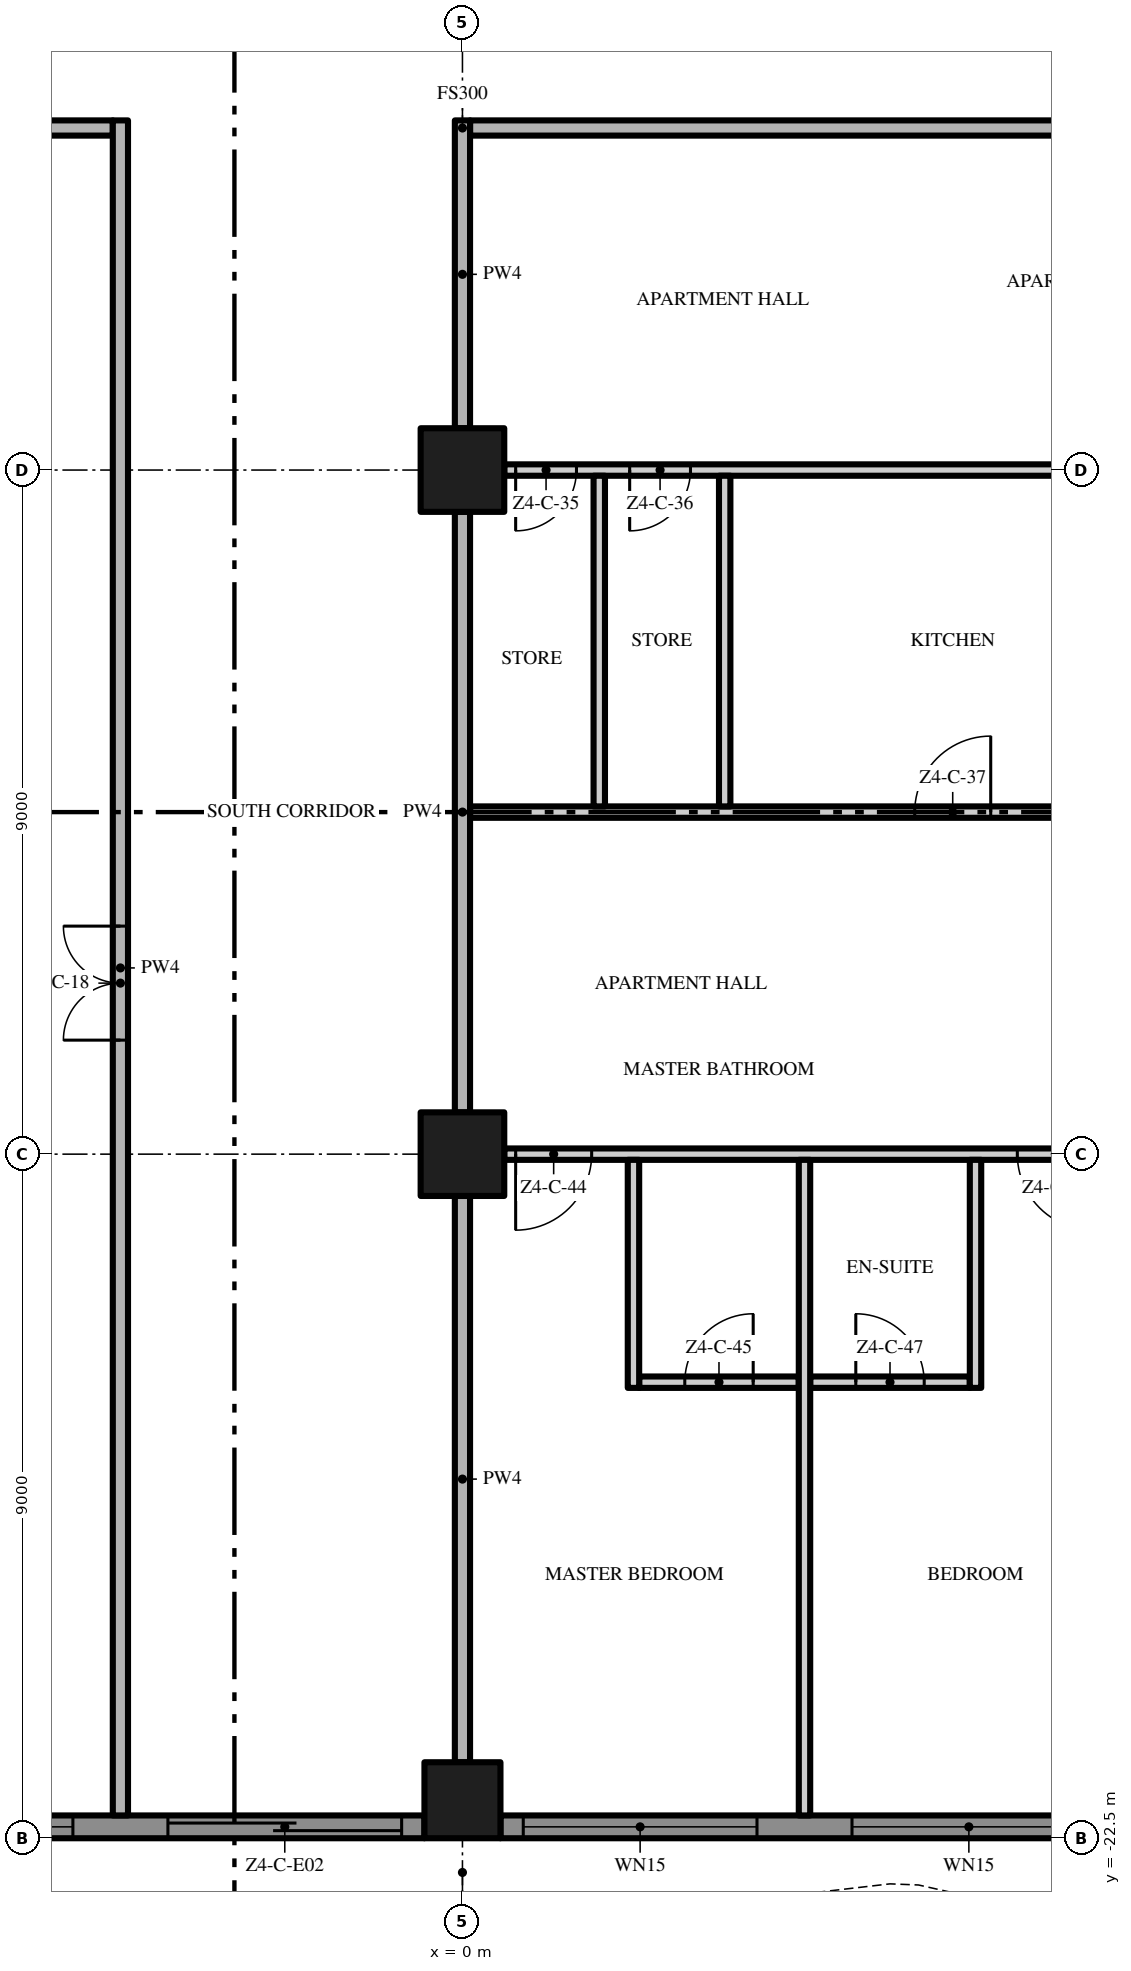
"""IFC4 building model, lengths in metres.
Left out: names, types, materials, properties, quantities, classifications, styles, units other than length and angle.
Written with IfcOpenShell. Run it as: python <this file> out.ifc"""

import sys

from ifc_helpers import new_model, si_unit, direction, frame, frame_2d, origin, origin_2d, place, context, subcontext, project, spatial, polyline, rectangle, outline, extrude, element, fill, save


model = new_model("IFC4")
c1 = context("Model", 3, precision=1e-05, world=origin(), true_north=direction((0.0, 1.0)))
c2 = subcontext(c1, "Body", "Model", "MODEL_VIEW")
j1 = project(units=[si_unit("LENGTHUNIT", "METRE"), si_unit("PLANEANGLEUNIT", "RADIAN")], contexts=[c1])
p1 = place(None, origin())
s1 = spatial("IfcSite", under=j1, at=p1, CompositionType="ELEMENT")
p2 = place(p1, origin())
s2 = spatial("IfcBuilding", under=s1, at=p2, CompositionType="ELEMENT")
p3 = place(p2, frame((0.0, 0.0, 207.2)))
s3 = spatial("IfcBuildingStorey", under=s2, at=p3, CompositionType="ELEMENT", Elevation=207.2)
p4 = place(p3, frame((0.0, -13.5, 0.0), z_axis=(0.0, 0.0, 1.0), x_axis=(1.0, 0.0, 0.0)))
e1 = element("IfcColumn", 1, at=p4, inside=s3, PredefinedType="COLUMN", context=c2, shape_type="SweptSolid", body=[
    extrude(rectangle(XDim=1.1, YDim=1.1, at=origin_2d()), origin(), (0.0, 0.0, 1.0), 3.5),
])
p5 = place(p3, frame((0.0, -22.0, 0.0), z_axis=(0.0, 0.0, 1.0), x_axis=(1.0, 0.0, 0.0)))
e2 = element("IfcColumn", 2, at=p5, inside=s3, PredefinedType="COLUMN", context=c2, shape_type="SweptSolid", body=[
    extrude(rectangle(XDim=1.0, YDim=1.0, at=origin_2d()), origin(), (0.0, 0.0, 1.0), 3.5),
])
p6 = place(p3, frame((0.0, -4.5, 0.0), z_axis=(0.0, 0.0, 1.0), x_axis=(1.0, 0.0, 0.0)))
e3 = element("IfcColumn", 3, at=p6, inside=s3, PredefinedType="COLUMN", context=c2, shape_type="SweptSolid", body=[
    extrude(rectangle(XDim=1.1, YDim=1.1, at=origin_2d()), origin(), (0.0, 0.0, 1.0), 3.5),
])
p7 = place(p3, frame((-0.5, -22.35, 0.0), z_axis=(0.0, 0.0, 1.0), x_axis=(-1.0, 0.0, 0.0)))
e4 = element("IfcWall", 4, at=p7, inside=s3, PredefinedType="SOLIDWALL", context=c2, shape_type="SweptSolid", body=[
    extrude(rectangle(XDim=8.0, YDim=0.3, at=frame_2d((4.0, 0.0))), origin(), (0.0, 0.0, 1.0), 3.5),
])
p8 = place(p7, frame((4.625, 0.0, 0.45)))
e5 = element("IfcOpeningElement", 5, at=p8, cuts=e4, PredefinedType="OPENING", context=c2, shape_type="SweptSolid", body=[
    extrude(rectangle(XDim=3.075, YDim=2.65, at=frame_2d((1.538, 1.325))), frame((0.0, 0.16, 0.0), z_axis=(0.0, -1.0, 0.0), x_axis=(1.0, 0.0, 0.0)), (0.0, 0.0, 1.0), 0.32),
])
p9 = place(p7, frame((0.3, 0.0, 0.0)))
e6 = element("IfcOpeningElement", 6, at=p9, cuts=e4, PredefinedType="OPENING", context=c2, shape_type="SweptSolid", body=[
    extrude(rectangle(XDim=3.075, YDim=2.4, at=frame_2d((1.538, 1.2))), frame((0.0, 0.16, 0.0), z_axis=(0.0, -1.0, 0.0), x_axis=(1.0, 0.0, 0.0)), (0.0, 0.0, 1.0), 0.32),
])
p10 = place(p3, frame((8.5, -22.35, 0.0), z_axis=(0.0, 0.0, 1.0), x_axis=(-1.0, 0.0, 0.0)))
e7 = element("IfcWall", 7, at=p10, inside=s3, PredefinedType="SOLIDWALL", context=c2, shape_type="SweptSolid", body=[
    extrude(rectangle(XDim=8.0, YDim=0.3, at=frame_2d((4.0, 0.0))), origin(), (0.0, 0.0, 1.0), 3.5),
])
p11 = place(p10, frame((4.625, 0.0, 0.45)))
e8 = element("IfcOpeningElement", 8, at=p11, cuts=e7, PredefinedType="OPENING", context=c2, shape_type="SweptSolid", body=[
    extrude(rectangle(XDim=3.075, YDim=2.65, at=frame_2d((1.538, 1.325))), frame((0.0, 0.16, 0.0), z_axis=(0.0, -1.0, 0.0), x_axis=(1.0, 0.0, 0.0)), (0.0, 0.0, 1.0), 0.32),
])
p12 = place(p10, frame((0.3, 0.0, 0.45)))
e9 = element("IfcOpeningElement", 9, at=p12, cuts=e7, PredefinedType="OPENING", context=c2, shape_type="SweptSolid", body=[
    extrude(rectangle(XDim=3.075, YDim=2.65, at=frame_2d((1.538, 1.325))), frame((0.0, 0.16, 0.0), z_axis=(0.0, -1.0, 0.0), x_axis=(1.0, 0.0, 0.0)), (0.0, 0.0, 1.0), 0.32),
])
p13 = place(p3, origin())
e10 = element("IfcWall", 10, at=p13, inside=s3, PredefinedType="USERDEFINED", context=c2, shape_type="SweptSolid", body=[
    extrude(outline(polyline([(-22.5, -23.451), (-21.0, -24.112), (-19.5, -24.845), (-18.0, -25.369), (-16.875, -25.5), (-16.5, -25.485), (-15.0, -25.149), (-13.5, -24.488), (-12.0, -23.755), (-10.5, -23.231), (-9.375, -23.1), (-9.0, -23.115), (-7.5, -23.451), (-6.0, -24.112), (-4.5, -24.845), (-3.0, -25.369), (-1.875, -25.5), (-1.5, -25.485), (0.0, -25.149), (1.5, -24.488), (3.0, -23.755), (4.5, -23.231), (5.625, -23.1), (6.0, -23.115), (7.5, -23.451), (9.0, -24.112), (10.5, -24.845), (12.0, -25.369), (13.125, -25.5), (13.5, -25.485), (15.0, -25.149), (16.5, -24.488), (18.0, -23.755), (19.5, -23.231), (20.625, -23.1), (21.0, -23.115), (22.5, -23.451), (22.555, -23.208), (21.033, -22.866), (20.615, -22.849), (19.444, -22.986), (17.904, -23.524), (16.395, -24.261), (14.921, -24.91), (13.467, -25.236), (13.135, -25.249), (12.056, -25.124), (10.596, -24.614), (9.105, -23.885), (7.579, -23.213), (6.033, -22.866), (5.615, -22.849), (4.444, -22.986), (2.904, -23.524), (1.395, -24.261), (-0.079, -24.91), (-1.533, -25.236), (-1.865, -25.249), (-2.944, -25.124), (-4.404, -24.614), (-5.895, -23.885), (-7.421, -23.213), (-8.967, -22.866), (-9.385, -22.849), (-10.556, -22.986), (-12.096, -23.524), (-13.605, -24.261), (-15.079, -24.91), (-16.533, -25.236), (-16.865, -25.249), (-17.944, -25.124), (-19.404, -24.614), (-20.895, -23.885), (-22.399, -23.223), (-22.5, -23.451)])), origin(), (0.0, 0.0, 1.0), 0.9),
])
p14 = place(p3, frame((2.325, -16.5, 0.0), z_axis=(0.0, 0.0, 1.0), x_axis=(1.0, 0.0, 0.0)))
e11 = element("IfcWall", 11, at=p14, inside=s3, PredefinedType="PARTITIONING", context=c2, shape_type="SweptSolid", body=[
    extrude(rectangle(XDim=2.1, YDim=0.15, at=frame_2d((1.05, 0.0))), origin(), (0.0, 0.0, 1.0), 3.5),
])
p15 = place(p14, frame((0.6, 0.0, 0.0)))
e12 = element("IfcOpeningElement", 12, at=p15, cuts=e11, PredefinedType="OPENING", context=c2, shape_type="SweptSolid", body=[
    extrude(rectangle(XDim=0.9, YDim=2.1, at=frame_2d((0.45, 1.05))), frame((0.0, 0.085, 0.0), z_axis=(0.0, -1.0, 0.0), x_axis=(1.0, 0.0, 0.0)), (0.0, 0.0, 1.0), 0.17),
])
p16 = place(p3, frame((4.575, -16.5, 0.0), z_axis=(0.0, 0.0, 1.0), x_axis=(1.0, 0.0, 0.0)))
e13 = element("IfcWall", 13, at=p16, inside=s3, PredefinedType="PARTITIONING", context=c2, shape_type="SweptSolid", body=[
    extrude(rectangle(XDim=2.1, YDim=0.15, at=frame_2d((1.05, 0.0))), origin(), (0.0, 0.0, 1.0), 3.5),
])
p17 = place(p16, frame((0.6, 0.0, 0.0)))
e14 = element("IfcOpeningElement", 14, at=p17, cuts=e13, PredefinedType="OPENING", context=c2, shape_type="SweptSolid", body=[
    extrude(rectangle(XDim=0.9, YDim=2.1, at=frame_2d((0.45, 1.05))), frame((0.0, 0.085, 0.0), z_axis=(0.0, -1.0, 0.0), x_axis=(1.0, 0.0, 0.0)), (0.0, 0.0, 1.0), 0.17),
])
p18 = place(p3, frame((8.45, -13.5, 0.0), z_axis=(0.0, 0.0, 1.0), x_axis=(-1.0, 0.0, 0.0)))
e15 = element("IfcWall", 15, at=p18, inside=s3, PredefinedType="PARTITIONING", context=c2, shape_type="SweptSolid", body=[
    extrude(rectangle(XDim=7.9, YDim=0.15, at=frame_2d((3.95, 0.0))), origin(), (0.0, 0.0, 1.0), 3.5),
])
p19 = place(p18, frame((6.75, 0.0, 0.0)))
e16 = element("IfcOpeningElement", 16, at=p19, cuts=e15, PredefinedType="OPENING", context=c2, shape_type="SweptSolid", body=[
    extrude(rectangle(XDim=1.0, YDim=2.4, at=frame_2d((0.5, 1.2))), frame((0.0, 0.085, 0.0), z_axis=(0.0, -1.0, 0.0), x_axis=(1.0, 0.0, 0.0)), (0.0, 0.0, 1.0), 0.17),
])
p20 = place(p18, frame((0.15, 0.0, 0.0)))
e17 = element("IfcOpeningElement", 17, at=p20, cuts=e15, PredefinedType="OPENING", context=c2, shape_type="SweptSolid", body=[
    extrude(rectangle(XDim=1.0, YDim=2.4, at=frame_2d((0.5, 1.2))), frame((0.0, 0.085, 0.0), z_axis=(0.0, -1.0, 0.0), x_axis=(1.0, 0.0, 0.0)), (0.0, 0.0, 1.0), 0.17),
])
p21 = place(p3, frame((0.1, -9.0, 0.0), z_axis=(0.0, 0.0, 1.0), x_axis=(1.0, 0.0, 0.0)))
e18 = element("IfcWall", 18, at=p21, inside=s3, PredefinedType="PARTITIONING", context=c2, shape_type="SweptSolid", body=[
    extrude(rectangle(XDim=11.525, YDim=0.15, at=frame_2d((5.763, 0.0))), origin(), (0.0, 0.0, 1.0), 3.5),
])
p22 = place(p21, frame((5.85, 0.0, 0.0)))
e19 = element("IfcOpeningElement", 19, at=p22, cuts=e18, PredefinedType="OPENING", context=c2, shape_type="SweptSolid", body=[
    extrude(rectangle(XDim=1.0, YDim=2.4, at=frame_2d((0.5, 1.2))), frame((0.0, 0.085, 0.0), z_axis=(0.0, -1.0, 0.0), x_axis=(1.0, 0.0, 0.0)), (0.0, 0.0, 1.0), 0.17),
])
p23 = place(p3, frame((8.45, -4.5, 0.0), z_axis=(0.0, 0.0, 1.0), x_axis=(-1.0, 0.0, 0.0)))
e20 = element("IfcWall", 20, at=p23, inside=s3, PredefinedType="PARTITIONING", context=c2, shape_type="SweptSolid", body=[
    extrude(rectangle(XDim=7.9, YDim=0.15, at=frame_2d((3.95, 0.0))), origin(), (0.0, 0.0, 1.0), 3.5),
])
p24 = place(p23, frame((6.95, 0.0, 0.0)))
e21 = element("IfcOpeningElement", 21, at=p24, cuts=e20, PredefinedType="OPENING", context=c2, shape_type="SweptSolid", body=[
    extrude(rectangle(XDim=0.8, YDim=2.0, at=frame_2d((0.4, 1.0))), frame((0.0, 0.085, 0.0), z_axis=(0.0, -1.0, 0.0), x_axis=(1.0, 0.0, 0.0)), (0.0, 0.0, 1.0), 0.17),
])
p25 = place(p23, frame((5.45, 0.0, 0.0)))
e22 = element("IfcOpeningElement", 22, at=p25, cuts=e20, PredefinedType="OPENING", context=c2, shape_type="SweptSolid", body=[
    extrude(rectangle(XDim=0.8, YDim=2.0, at=frame_2d((0.4, 1.0))), frame((0.0, 0.085, 0.0), z_axis=(0.0, -1.0, 0.0), x_axis=(1.0, 0.0, 0.0)), (0.0, 0.0, 1.0), 0.17),
])
p26 = place(p3, frame((-17.4, 0.0, 0.0), z_axis=(0.0, 0.0, 1.0), x_axis=(1.0, 0.0, 0.0)))
e23 = element("IfcWall", 23, at=p26, inside=s3, PredefinedType="PARTITIONING", context=c2, shape_type="SweptSolid", body=[
    extrude(rectangle(XDim=12.8, YDim=0.2, at=frame_2d((6.4, 0.0))), origin(), (0.0, 0.0, 1.0), 3.5),
])
p27 = place(p3, frame((17.4, 0.0, 0.0), z_axis=(0.0, 0.0, 1.0), x_axis=(-1.0, 0.0, 0.0)))
e24 = element("IfcWall", 24, at=p27, inside=s3, PredefinedType="PARTITIONING", context=c2, shape_type="SweptSolid", body=[
    extrude(rectangle(XDim=17.3, YDim=0.2, at=frame_2d((8.65, 0.0))), origin(), (0.0, 0.0, 1.0), 3.5),
])
p28 = place(p27, frame((7.65, 0.0, 0.0)))
e25 = element("IfcOpeningElement", 25, at=p28, cuts=e24, PredefinedType="OPENING", context=c2, shape_type="SweptSolid", body=[
    extrude(rectangle(XDim=1.5, YDim=2.4, at=frame_2d((0.75, 1.2))), frame((0.0, 0.11, 0.0), z_axis=(0.0, -1.0, 0.0), x_axis=(1.0, 0.0, 0.0)), (0.0, 0.0, 1.0), 0.22),
])
p29 = place(p3, frame((-4.5, -22.2, 0.0), z_axis=(0.0, 0.0, 1.0), x_axis=(0.0, 1.0, 0.0)))
e26 = element("IfcWall", 26, at=p29, inside=s3, PredefinedType="PARTITIONING", context=c2, shape_type="SweptSolid", body=[
    extrude(rectangle(XDim=22.3, YDim=0.2, at=frame_2d((11.15, 0.0))), origin(), (0.0, 0.0, 1.0), 3.5),
])
p30 = place(p29, frame((10.2, 0.0, 0.0)))
e27 = element("IfcOpeningElement", 27, at=p30, cuts=e26, PredefinedType="OPENING", context=c2, shape_type="SweptSolid", body=[
    extrude(rectangle(XDim=1.5, YDim=2.4, at=frame_2d((0.75, 1.2))), frame((0.0, 0.11, 0.0), z_axis=(0.0, -1.0, 0.0), x_axis=(1.0, 0.0, 0.0)), (0.0, 0.0, 1.0), 0.22),
])
p31 = place(p3, frame((0.0, -21.5, 0.0), z_axis=(0.0, 0.0, 1.0), x_axis=(0.0, 1.0, 0.0)))
e28 = element("IfcWall", 28, at=p31, inside=s3, PredefinedType="PARTITIONING", context=c2, shape_type="SweptSolid", body=[
    extrude(rectangle(XDim=7.45, YDim=0.2, at=frame_2d((3.725, 0.0))), origin(), (0.0, 0.0, 1.0), 3.5),
])
p32 = place(p3, frame((0.0, -12.95, 0.0), z_axis=(0.0, 0.0, 1.0), x_axis=(0.0, 1.0, 0.0)))
e29 = element("IfcWall", 29, at=p32, inside=s3, PredefinedType="PARTITIONING", context=c2, shape_type="SweptSolid", body=[
    extrude(rectangle(XDim=7.9, YDim=0.2, at=frame_2d((3.95, 0.0))), origin(), (0.0, 0.0, 1.0), 3.5),
])
p33 = place(p3, frame((0.0, -3.95, 0.0), z_axis=(0.0, 0.0, 1.0), x_axis=(0.0, 1.0, 0.0)))
e30 = element("IfcWall", 30, at=p33, inside=s3, PredefinedType="PARTITIONING", context=c2, shape_type="SweptSolid", body=[
    extrude(rectangle(XDim=4.05, YDim=0.2, at=frame_2d((2.025, 0.0))), origin(), (0.0, 0.0, 1.0), 3.5),
])
p34 = place(p3, frame((1.8, -8.925, 0.0), z_axis=(0.0, 0.0, 1.0), x_axis=(0.0, 1.0, 0.0)))
e31 = element("IfcWall", 31, at=p34, inside=s3, PredefinedType="PARTITIONING", context=c2, shape_type="SweptSolid", body=[
    extrude(rectangle(XDim=4.35, YDim=0.15, at=frame_2d((2.175, 0.0))), origin(), (0.0, 0.0, 1.0), 3.5),
])
p35 = place(p3, frame((2.25, -16.575, 0.0), z_axis=(0.0, 0.0, 1.0), x_axis=(0.0, 1.0, 0.0)))
e32 = element("IfcWall", 32, at=p35, inside=s3, PredefinedType="PARTITIONING", context=c2, shape_type="SweptSolid", body=[
    extrude(rectangle(XDim=3.0, YDim=0.15, at=frame_2d((1.5, 0.0))), origin(), (0.0, 0.0, 1.0), 3.5),
])
p36 = place(p3, frame((3.45, -8.925, 0.0), z_axis=(0.0, 0.0, 1.0), x_axis=(0.0, 1.0, 0.0)))
e33 = element("IfcWall", 33, at=p36, inside=s3, PredefinedType="PARTITIONING", context=c2, shape_type="SweptSolid", body=[
    extrude(rectangle(XDim=4.35, YDim=0.15, at=frame_2d((2.175, 0.0))), origin(), (0.0, 0.0, 1.0), 3.5),
])
p37 = place(p3, frame((4.5, -22.2, 0.0), z_axis=(0.0, 0.0, 1.0), x_axis=(0.0, 1.0, 0.0)))
e34 = element("IfcWall", 34, at=p37, inside=s3, PredefinedType="PARTITIONING", context=c2, shape_type="SweptSolid", body=[
    extrude(rectangle(XDim=8.625, YDim=0.15, at=frame_2d((4.312, 0.0))), origin(), (0.0, 0.0, 1.0), 3.5),
])
p38 = place(p3, frame((6.75, -16.575, 0.0), z_axis=(0.0, 0.0, 1.0), x_axis=(0.0, 1.0, 0.0)))
e35 = element("IfcWall", 35, at=p38, inside=s3, PredefinedType="PARTITIONING", context=c2, shape_type="SweptSolid", body=[
    extrude(rectangle(XDim=3.0, YDim=0.15, at=frame_2d((1.5, 0.0))), origin(), (0.0, 0.0, 1.0), 3.5),
])
p39 = place(p8, origin())
e36 = element("IfcWindow", 36, at=p39, inside=s3, PartitioningType="SINGLE_PANEL", PredefinedType="WINDOW", context=c2, shape_type="SweptSolid", body=[
    extrude(rectangle(XDim=3.075, YDim=2.65, at=frame_2d((1.538, 1.325))), frame((0.0, 0.03, 0.0), z_axis=(0.0, -1.0, 0.0), x_axis=(1.0, 0.0, 0.0)), (0.0, 0.0, 1.0), 0.06),
])
fill(e5, e36)
p40 = place(p9, origin())
e37 = element("IfcDoor", 37, at=p40, inside=s3, OperationType="SINGLE_SWING_LEFT", PredefinedType="DOOR", context=c2, shape_type="SweptSolid", body=[
    extrude(rectangle(XDim=3.075, YDim=2.4, at=frame_2d((1.538, 1.2))), frame((0.0, 0.025, 0.0), z_axis=(0.0, -1.0, 0.0), x_axis=(1.0, 0.0, 0.0)), (0.0, 0.0, 1.0), 0.05),
])
fill(e6, e37)
p41 = place(p11, origin())
e38 = element("IfcWindow", 38, at=p41, inside=s3, PartitioningType="SINGLE_PANEL", PredefinedType="WINDOW", context=c2, shape_type="SweptSolid", body=[
    extrude(rectangle(XDim=3.075, YDim=2.65, at=frame_2d((1.538, 1.325))), frame((0.0, 0.03, 0.0), z_axis=(0.0, -1.0, 0.0), x_axis=(1.0, 0.0, 0.0)), (0.0, 0.0, 1.0), 0.06),
])
fill(e8, e38)
p42 = place(p12, origin())
e39 = element("IfcWindow", 39, at=p42, inside=s3, PartitioningType="SINGLE_PANEL", PredefinedType="WINDOW", context=c2, shape_type="SweptSolid", body=[
    extrude(rectangle(XDim=3.075, YDim=2.65, at=frame_2d((1.538, 1.325))), frame((0.0, 0.03, 0.0), z_axis=(0.0, -1.0, 0.0), x_axis=(1.0, 0.0, 0.0)), (0.0, 0.0, 1.0), 0.06),
])
fill(e9, e39)
p43 = place(p30, origin())
e40 = element("IfcDoor", 40, at=p43, inside=s3, OperationType="DOUBLE_DOOR_SINGLE_SWING", PredefinedType="DOOR", context=c2, shape_type="SweptSolid", body=[
    extrude(rectangle(XDim=1.5, YDim=2.4, at=frame_2d((0.75, 1.2))), frame((0.0, 0.025, 0.0), z_axis=(0.0, -1.0, 0.0), x_axis=(1.0, 0.0, 0.0)), (0.0, 0.0, 1.0), 0.05),
])
fill(e27, e40)
p44 = place(p24, origin())
e41 = element("IfcDoor", 41, at=p44, inside=s3, OperationType="SINGLE_SWING_RIGHT", PredefinedType="DOOR", context=c2, shape_type="SweptSolid", body=[
    extrude(rectangle(XDim=0.8, YDim=2.0, at=frame_2d((0.4, 1.0))), frame((0.0, 0.025, 0.0), z_axis=(0.0, -1.0, 0.0), x_axis=(1.0, 0.0, 0.0)), (0.0, 0.0, 1.0), 0.05),
])
fill(e21, e41)
p45 = place(p25, origin())
e42 = element("IfcDoor", 42, at=p45, inside=s3, OperationType="SINGLE_SWING_RIGHT", PredefinedType="DOOR", context=c2, shape_type="SweptSolid", body=[
    extrude(rectangle(XDim=0.8, YDim=2.0, at=frame_2d((0.4, 1.0))), frame((0.0, 0.025, 0.0), z_axis=(0.0, -1.0, 0.0), x_axis=(1.0, 0.0, 0.0)), (0.0, 0.0, 1.0), 0.05),
])
fill(e22, e42)
p46 = place(p22, origin())
e43 = element("IfcDoor", 43, at=p46, inside=s3, OperationType="SINGLE_SWING_RIGHT", PredefinedType="DOOR", context=c2, shape_type="SweptSolid", body=[
    extrude(rectangle(XDim=1.0, YDim=2.4, at=frame_2d((0.5, 1.2))), frame((0.0, 0.025, 0.0), z_axis=(0.0, -1.0, 0.0), x_axis=(1.0, 0.0, 0.0)), (0.0, 0.0, 1.0), 0.05),
])
fill(e19, e43)
p47 = place(p19, origin())
e44 = element("IfcDoor", 44, at=p47, inside=s3, OperationType="SINGLE_SWING_RIGHT", PredefinedType="DOOR", context=c2, shape_type="SweptSolid", body=[
    extrude(rectangle(XDim=1.0, YDim=2.4, at=frame_2d((0.5, 1.2))), frame((0.0, 0.025, 0.0), z_axis=(0.0, -1.0, 0.0), x_axis=(1.0, 0.0, 0.0)), (0.0, 0.0, 1.0), 0.05),
])
fill(e16, e44)
p48 = place(p15, origin())
e45 = element("IfcDoor", 45, at=p48, inside=s3, OperationType="SINGLE_SWING_RIGHT", PredefinedType="DOOR", context=c2, shape_type="SweptSolid", body=[
    extrude(rectangle(XDim=0.9, YDim=2.1, at=frame_2d((0.45, 1.05))), frame((0.0, 0.025, 0.0), z_axis=(0.0, -1.0, 0.0), x_axis=(1.0, 0.0, 0.0)), (0.0, 0.0, 1.0), 0.05),
])
fill(e12, e45)
p49 = place(p20, origin())
e46 = element("IfcDoor", 46, at=p49, inside=s3, OperationType="SINGLE_SWING_LEFT", PredefinedType="DOOR", context=c2, shape_type="SweptSolid", body=[
    extrude(rectangle(XDim=1.0, YDim=2.4, at=frame_2d((0.5, 1.2))), frame((0.0, 0.025, 0.0), z_axis=(0.0, -1.0, 0.0), x_axis=(1.0, 0.0, 0.0)), (0.0, 0.0, 1.0), 0.05),
])
fill(e17, e46)
p50 = place(p17, origin())
e47 = element("IfcDoor", 47, at=p50, inside=s3, OperationType="SINGLE_SWING_LEFT", PredefinedType="DOOR", context=c2, shape_type="SweptSolid", body=[
    extrude(rectangle(XDim=0.9, YDim=2.1, at=frame_2d((0.45, 1.05))), frame((0.0, 0.025, 0.0), z_axis=(0.0, -1.0, 0.0), x_axis=(1.0, 0.0, 0.0)), (0.0, 0.0, 1.0), 0.05),
])
fill(e14, e47)
save(model, sys.argv[1])
